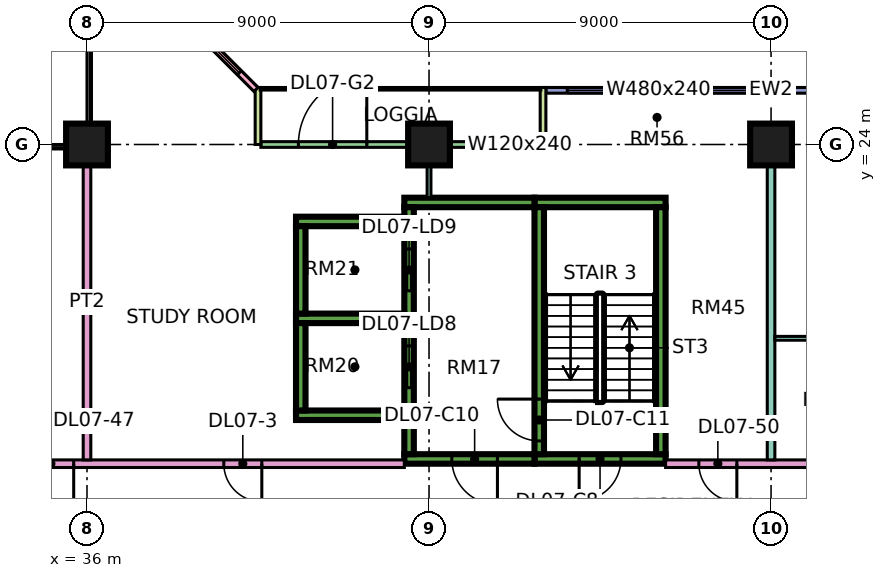
"""IFC4 building model, lengths in metres.
Left out: names, types, materials, properties, quantities, classifications, styles, units other than length and angle.
Written with IfcOpenShell. Run it as: python <this file> out.ifc"""

import sys

from ifc_helpers import new_model, si_unit, direction, frame, frame_2d, origin, origin_2d, place, context, subcontext, project, spatial, rectangle, extrude, element, fill, save


model = new_model("IFC4")
c1 = context("Model", 3, precision=1e-05, world=origin(), true_north=direction((0.0, 1.0)))
c2 = subcontext(c1, "Body", "Model", "MODEL_VIEW")
j1 = project(units=[si_unit("LENGTHUNIT", "METRE"), si_unit("PLANEANGLEUNIT", "RADIAN")], contexts=[c1])
p1 = place(None, origin())
s1 = spatial("IfcSite", under=j1, at=p1, CompositionType="ELEMENT")
p2 = place(p1, origin())
s2 = spatial("IfcBuilding", under=s1, at=p2, CompositionType="ELEMENT")
p3 = place(p2, frame((0.0, 0.0, 41.4)))
s3 = spatial("IfcBuildingStorey", under=s2, at=p3, CompositionType="ELEMENT", Elevation=41.4)
for number, where, z_axis, x_axis in (
    (1, (36.0, 24.0, 0.0), (0.0, 0.0, 1.0), (1.0, 0.0, 0.0)),
    (2, (45.0, 24.0, 0.0), (0.0, 0.0, 1.0), (1.0, 0.0, 0.0)),
    (3, (54.0, 24.0, 0.0), (0.0, 0.0, 1.0), (1.0, 0.0, 0.0)),
):
    element("IfcColumn", number, at=place(p3, frame(where, z_axis=z_axis, x_axis=x_axis)), inside=s3, PredefinedType="COLUMN", context=c2, shape_type="SweptSolid", body=[
        extrude(rectangle(XDim=1.1, YDim=1.1, at=origin_2d()), origin(), (0.0, 0.0, 1.0), 3.75),
    ])
p4 = place(p3, frame((47.775, 15.725, 0.0), z_axis=(0.0, 0.0, 1.0), x_axis=(1.0, 0.0, 0.0)))
e4 = element("IfcWall", 4, at=p4, inside=s3, PredefinedType="SHEAR", context=c2, shape_type="SweptSolid", body=[
    extrude(rectangle(XDim=3.45, YDim=0.25, at=frame_2d((1.725, 0.0))), origin(), (0.0, 0.0, 1.0), 3.75),
])
p5 = place(p4, frame((1.175, 0.0, 0.0)))
e5 = element("IfcOpeningElement", 5, at=p5, cuts=e4, PredefinedType="OPENING", context=c2, shape_type="SweptSolid", body=[
    extrude(rectangle(XDim=1.1, YDim=2.2, at=frame_2d((0.55, 1.1))), frame((0.0, 0.135, 0.0), z_axis=(0.0, -1.0, 0.0), x_axis=(1.0, 0.0, 0.0)), (0.0, 0.0, 1.0), 0.27),
])
p6 = place(p3, frame((47.775, 22.475, 0.0), z_axis=(0.0, 0.0, 1.0), x_axis=(1.0, 0.0, 0.0)))
e6 = element("IfcWall", 6, at=p6, inside=s3, PredefinedType="SHEAR", context=c2, shape_type="SweptSolid", body=[
    extrude(rectangle(XDim=3.45, YDim=0.25, at=frame_2d((1.725, 0.0))), origin(), (0.0, 0.0, 1.0), 3.75),
])
p7 = place(p3, frame((47.9, 15.85, 0.0), z_axis=(0.0, 0.0, 1.0), x_axis=(0.0, 1.0, 0.0)))
e7 = element("IfcWall", 7, at=p7, inside=s3, PredefinedType="SHEAR", context=c2, shape_type="SweptSolid", body=[
    extrude(rectangle(XDim=6.5, YDim=0.25, at=frame_2d((3.25, 0.0))), origin(), (0.0, 0.0, 1.0), 3.75),
])
p8 = place(p7, frame((0.35, 0.0, 0.0)))
e8 = element("IfcOpeningElement", 8, at=p8, cuts=e7, PredefinedType="OPENING", context=c2, shape_type="SweptSolid", body=[
    extrude(rectangle(XDim=1.1, YDim=2.2, at=frame_2d((0.55, 1.1))), frame((0.0, 0.135, 0.0), z_axis=(0.0, -1.0, 0.0), x_axis=(1.0, 0.0, 0.0)), (0.0, 0.0, 1.0), 0.27),
])
p9 = place(p3, frame((51.1, 15.85, 0.0), z_axis=(0.0, 0.0, 1.0), x_axis=(0.0, 1.0, 0.0)))
e9 = element("IfcWall", 9, at=p9, inside=s3, PredefinedType="SHEAR", context=c2, shape_type="SweptSolid", body=[
    extrude(rectangle(XDim=6.5, YDim=0.25, at=frame_2d((3.25, 0.0))), origin(), (0.0, 0.0, 1.0), 3.75),
])
p10 = place(p3, frame((44.35, 15.725, 0.0), z_axis=(0.0, 0.0, 1.0), x_axis=(1.0, 0.0, 0.0)))
e10 = element("IfcWall", 10, at=p10, inside=s3, PredefinedType="SHEAR", context=c2, shape_type="SweptSolid", body=[
    extrude(rectangle(XDim=3.425, YDim=0.25, at=frame_2d((1.712, 0.0))), origin(), (0.0, 0.0, 1.0), 3.75),
])
p11 = place(p10, frame((1.25, 0.0, 0.0)))
e11 = element("IfcOpeningElement", 11, at=p11, cuts=e10, PredefinedType="OPENING", context=c2, shape_type="SweptSolid", body=[
    extrude(rectangle(XDim=1.2, YDim=2.2, at=frame_2d((0.6, 1.1))), frame((0.0, 0.135, 0.0), z_axis=(0.0, -1.0, 0.0), x_axis=(1.0, 0.0, 0.0)), (0.0, 0.0, 1.0), 0.27),
])
p12 = place(p3, frame((44.35, 22.475, 0.0), z_axis=(0.0, 0.0, 1.0), x_axis=(1.0, 0.0, 0.0)))
e12 = element("IfcWall", 12, at=p12, inside=s3, PredefinedType="SHEAR", context=c2, shape_type="SweptSolid", body=[
    extrude(rectangle(XDim=3.425, YDim=0.25, at=frame_2d((1.712, 0.0))), origin(), (0.0, 0.0, 1.0), 3.75),
])
p13 = place(p3, frame((44.475, 15.85, 0.0), z_axis=(0.0, 0.0, 1.0), x_axis=(0.0, 1.0, 0.0)))
e13 = element("IfcWall", 13, at=p13, inside=s3, PredefinedType="SHEAR", context=c2, shape_type="SweptSolid", body=[
    extrude(rectangle(XDim=6.5, YDim=0.25, at=frame_2d((3.25, 0.0))), origin(), (0.0, 0.0, 1.0), 3.75),
])
p14 = place(p13, frame((1.75, 0.0, 0.0)))
e14 = element("IfcOpeningElement", 14, at=p14, cuts=e13, PredefinedType="OPENING", context=c2, shape_type="SweptSolid", body=[
    extrude(rectangle(XDim=1.1, YDim=2.2, at=frame_2d((0.55, 1.1))), frame((0.0, 0.135, 0.0), z_axis=(0.0, -1.0, 0.0), x_axis=(1.0, 0.0, 0.0)), (0.0, 0.0, 1.0), 0.27),
])
p15 = place(p13, frame((4.3, 0.0, 0.0)))
e15 = element("IfcOpeningElement", 15, at=p15, cuts=e13, PredefinedType="OPENING", context=c2, shape_type="SweptSolid", body=[
    extrude(rectangle(XDim=1.1, YDim=2.2, at=frame_2d((0.55, 1.1))), frame((0.0, 0.135, 0.0), z_axis=(0.0, -1.0, 0.0), x_axis=(1.0, 0.0, 0.0)), (0.0, 0.0, 1.0), 0.27),
])
for number, where, z_axis, x_axis in (
    (16, (41.5, 16.875, 0.0), (0.0, 0.0, 1.0), (1.0, 0.0, 0.0)),
    (17, (41.5, 19.425, 0.0), (0.0, 0.0, 1.0), (1.0, 0.0, 0.0)),
    (18, (41.5, 21.975, 0.0), (0.0, 0.0, 1.0), (1.0, 0.0, 0.0)),
):
    element("IfcWall", number, at=place(p3, frame(where, z_axis=z_axis, x_axis=x_axis)), inside=s3, PredefinedType="SHEAR", context=c2, shape_type="SweptSolid", body=[
        extrude(rectangle(XDim=2.85, YDim=0.25, at=frame_2d((1.425, 0.0))), origin(), (0.0, 0.0, 1.0), 3.75),
    ])
for number, where, z_axis, x_axis in (
    (19, (41.625, 17.0, 0.0), (0.0, 0.0, 1.0), (0.0, 1.0, 0.0)),
    (20, (41.625, 19.55, 0.0), (0.0, 0.0, 1.0), (0.0, 1.0, 0.0)),
):
    element("IfcWall", number, at=place(p3, frame(where, z_axis=z_axis, x_axis=x_axis)), inside=s3, PredefinedType="SHEAR", context=c2, shape_type="SweptSolid", body=[
        extrude(rectangle(XDim=2.3, YDim=0.25, at=frame_2d((1.15, 0.0))), origin(), (0.0, 0.0, 1.0), 3.75),
    ])
p16 = place(p3, frame((59.925, 25.425, 0.0), z_axis=(0.0, 0.0, 1.0), x_axis=(-1.0, 0.0, 0.0)))
e21 = element("IfcWall", 21, at=p16, inside=s3, PredefinedType="SOLIDWALL", context=c2, shape_type="SweptSolid", body=[
    extrude(rectangle(XDim=11.85, YDim=0.15, at=frame_2d((5.925, 0.0))), origin(), (0.0, 0.0, 1.0), 3.35),
])
p17 = place(p16, frame((1.462, 0.0, 0.45)))
e22 = element("IfcOpeningElement", 22, at=p17, cuts=e21, PredefinedType="OPENING", context=c2, shape_type="SweptSolid", body=[
    extrude(rectangle(XDim=3.0, YDim=2.4, at=frame_2d((1.5, 1.2))), frame((0.0, 0.085, 0.0), z_axis=(0.0, -1.0, 0.0), x_axis=(1.0, 0.0, 0.0)), (0.0, 0.0, 1.0), 0.17),
])
p18 = place(p16, frame((6.488, 0.0, 0.45)))
e23 = element("IfcOpeningElement", 23, at=p18, cuts=e21, PredefinedType="OPENING", context=c2, shape_type="SweptSolid", body=[
    extrude(rectangle(XDim=4.8, YDim=2.4, at=frame_2d((2.4, 1.2))), frame((0.0, 0.085, 0.0), z_axis=(0.0, -1.0, 0.0), x_axis=(1.0, 0.0, 0.0)), (0.0, 0.0, 1.0), 0.17),
])
p19 = place(p3, frame((47.925, 24.0, 0.0), z_axis=(0.0, 0.0, 1.0), x_axis=(-1.0, 0.0, 0.0)))
e24 = element("IfcWall", 24, at=p19, inside=s3, PredefinedType="SOLIDWALL", context=c2, shape_type="SweptSolid", body=[
    extrude(rectangle(XDim=7.35, YDim=0.15, at=frame_2d((3.675, 0.0))), origin(), (0.0, 0.0, 1.0), 3.35),
])
p20 = place(p19, frame((0.538, 0.0, 0.45)))
e25 = element("IfcOpeningElement", 25, at=p20, cuts=e24, PredefinedType="OPENING", context=c2, shape_type="SweptSolid", body=[
    extrude(rectangle(XDim=1.2, YDim=2.4, at=frame_2d((0.6, 1.2))), frame((0.0, 0.085, 0.0), z_axis=(0.0, -1.0, 0.0), x_axis=(1.0, 0.0, 0.0)), (0.0, 0.0, 1.0), 0.17),
])
p21 = place(p19, frame((4.562, 0.0, 0.0)))
e26 = element("IfcOpeningElement", 26, at=p21, cuts=e24, PredefinedType="OPENING", context=c2, shape_type="SweptSolid", body=[
    extrude(rectangle(XDim=1.8, YDim=2.4, at=frame_2d((0.9, 1.2))), frame((0.0, 0.085, 0.0), z_axis=(0.0, -1.0, 0.0), x_axis=(1.0, 0.0, 0.0)), (0.0, 0.0, 1.0), 0.17),
])
for number, where, z_axis, x_axis in (
    (27, (48.0, 25.5, 0.0), (0.0, 0.0, 1.0), (0.0, -1.0, 0.0)),
    (28, (40.5, 25.5, 0.0), (0.0, 0.0, 1.0), (0.0, -1.0, 0.0)),
):
    element("IfcWall", number, at=place(p3, frame(where, z_axis=z_axis, x_axis=x_axis)), inside=s3, PredefinedType="SOLIDWALL", context=c2, shape_type="SweptSolid", body=[
        extrude(rectangle(XDim=1.5, YDim=0.15, at=frame_2d((0.75, 0.0))), origin(), (0.0, 0.0, 1.0), 3.35),
    ])
p22 = place(p3, frame((40.447, 25.447, 0.0), z_axis=(0.0, 0.0, 1.0), x_axis=(-0.707106781187, 0.707106781187, 0.0)))
e29 = element("IfcWall", 29, at=p22, inside=s3, PredefinedType="SOLIDWALL", context=c2, shape_type="SweptSolid", body=[
    extrude(rectangle(XDim=4.243, YDim=0.15, at=frame_2d((2.121, 0.0))), origin(), (0.0, 0.0, 1.0), 3.35),
])
p23 = place(p22, frame((0.621, 0.0, 0.45)))
e30 = element("IfcOpeningElement", 30, at=p23, cuts=e29, PredefinedType="OPENING", context=c2, shape_type="SweptSolid", body=[
    extrude(rectangle(XDim=3.0, YDim=2.4, at=frame_2d((1.5, 1.2))), frame((0.0, 0.085, 0.0), z_axis=(0.0, -1.0, 0.0), x_axis=(1.0, 0.0, 0.0)), (0.0, 0.0, 1.0), 0.17),
])
p24 = place(p3, frame((34.0, 15.6, 0.0), z_axis=(0.0, 0.0, 1.0), x_axis=(1.0, 0.0, 0.0)))
e31 = element("IfcWall", 31, at=p24, inside=s3, PredefinedType="PARTITIONING", context=c2, shape_type="SweptSolid", body=[
    extrude(rectangle(XDim=10.35, YDim=0.2, at=frame_2d((5.175, 0.0))), origin(), (0.0, 0.0, 1.0), 3.35),
])
p25 = place(p24, frame((5.6, 0.0, 0.0)))
e32 = element("IfcOpeningElement", 32, at=p25, cuts=e31, PredefinedType="OPENING", context=c2, shape_type="SweptSolid", body=[
    extrude(rectangle(XDim=1.0, YDim=2.1, at=frame_2d((0.5, 1.05))), frame((0.0, 0.11, 0.0), z_axis=(0.0, -1.0, 0.0), x_axis=(1.0, 0.0, 0.0)), (0.0, 0.0, 1.0), 0.22),
])
p26 = place(p24, frame((0.45, 0.0, 0.0)))
e33 = element("IfcOpeningElement", 33, at=p26, cuts=e31, PredefinedType="OPENING", context=c2, shape_type="SweptSolid", body=[
    extrude(rectangle(XDim=1.2, YDim=2.1, at=frame_2d((0.6, 1.05))), frame((0.0, 0.11, 0.0), z_axis=(0.0, -1.0, 0.0), x_axis=(1.0, 0.0, 0.0)), (0.0, 0.0, 1.0), 0.22),
])
p27 = place(p3, frame((36.0, 15.7, 0.0), z_axis=(0.0, 0.0, 1.0), x_axis=(0.0, 1.0, 0.0)))
e34 = element("IfcWall", 34, at=p27, inside=s3, PredefinedType="PARTITIONING", context=c2, shape_type="SweptSolid", body=[
    extrude(rectangle(XDim=8.3, YDim=0.2, at=frame_2d((4.15, 0.0))), origin(), (0.0, 0.0, 1.0), 3.35),
])
p28 = place(p3, frame((45.0, 22.6, 0.0), z_axis=(0.0, 0.0, 1.0), x_axis=(0.0, 1.0, 0.0)))
e35 = element("IfcWall", 35, at=p28, inside=s3, PredefinedType="PARTITIONING", context=c2, shape_type="SweptSolid", body=[
    extrude(rectangle(XDim=1.326, YDim=0.1, at=frame_2d((0.663, 0.0))), origin(), (0.0, 0.0, 1.0), 3.35),
])
p29 = place(p3, frame((51.225, 15.6, 0.0), z_axis=(0.0, 0.0, 1.0), x_axis=(1.0, 0.0, 0.0)))
e36 = element("IfcWall", 36, at=p29, inside=s3, PredefinedType="PARTITIONING", context=c2, shape_type="SweptSolid", body=[
    extrude(rectangle(XDim=20.701, YDim=0.2, at=frame_2d((10.351, 0.0))), origin(), (0.0, 0.0, 1.0), 3.35),
])
p30 = place(p29, frame((9.875, 0.0, 0.0)))
e37 = element("IfcOpeningElement", 37, at=p30, cuts=e36, PredefinedType="OPENING", context=c2, shape_type="SweptSolid", body=[
    extrude(rectangle(XDim=1.0, YDim=2.1, at=frame_2d((0.5, 1.05))), frame((0.0, 0.11, 0.0), z_axis=(0.0, -1.0, 0.0), x_axis=(1.0, 0.0, 0.0)), (0.0, 0.0, 1.0), 0.22),
])
p31 = place(p29, frame((0.875, 0.0, 0.0)))
e38 = element("IfcOpeningElement", 38, at=p31, cuts=e36, PredefinedType="OPENING", context=c2, shape_type="SweptSolid", body=[
    extrude(rectangle(XDim=1.0, YDim=2.1, at=frame_2d((0.5, 1.05))), frame((0.0, 0.11, 0.0), z_axis=(0.0, -1.0, 0.0), x_axis=(1.0, 0.0, 0.0)), (0.0, 0.0, 1.0), 0.22),
])
p32 = place(p3, frame((54.0, 15.7, 0.0), z_axis=(0.0, 0.0, 1.0), x_axis=(0.0, 1.0, 0.0)))
e39 = element("IfcWall", 39, at=p32, inside=s3, PredefinedType="PARTITIONING", context=c2, shape_type="SweptSolid", body=[
    extrude(rectangle(XDim=8.3, YDim=0.2, at=frame_2d((4.15, 0.0))), origin(), (0.0, 0.0, 1.0), 3.35),
])
p33 = place(p3, frame((54.1, 18.9, 0.0), z_axis=(0.0, 0.0, 1.0), x_axis=(1.0, 0.0, 0.0)))
e40 = element("IfcWall", 40, at=p33, inside=s3, PredefinedType="PARTITIONING", context=c2, shape_type="SweptSolid", body=[
    extrude(rectangle(XDim=5.65, YDim=0.1, at=frame_2d((2.825, 0.0))), origin(), (0.0, 0.0, 1.0), 3.35),
])
p34 = place(p18, origin())
e41 = element("IfcWindow", 41, at=p34, inside=s3, PartitioningType="SINGLE_PANEL", PredefinedType="WINDOW", context=c2, shape_type="SweptSolid", body=[
    extrude(rectangle(XDim=4.8, YDim=2.4, at=frame_2d((2.4, 1.2))), frame((0.0, 0.03, 0.0), z_axis=(0.0, -1.0, 0.0), x_axis=(1.0, 0.0, 0.0)), (0.0, 0.0, 1.0), 0.06),
])
fill(e23, e41)
p35 = place(p20, origin())
e42 = element("IfcWindow", 42, at=p35, inside=s3, PartitioningType="SINGLE_PANEL", PredefinedType="WINDOW", context=c2, shape_type="SweptSolid", body=[
    extrude(rectangle(XDim=1.2, YDim=2.4, at=frame_2d((0.6, 1.2))), frame((0.0, 0.03, 0.0), z_axis=(0.0, -1.0, 0.0), x_axis=(1.0, 0.0, 0.0)), (0.0, 0.0, 1.0), 0.06),
])
fill(e25, e42)
p36 = place(p21, frame((1.8, 0.0, 0.0), z_axis=(0.0, 0.0, 1.0), x_axis=(-1.0, 0.0, 0.0)))
e43 = element("IfcDoor", 43, at=p36, inside=s3, OperationType="DOUBLE_DOOR_SINGLE_SWING", PredefinedType="DOOR", context=c2, shape_type="SweptSolid", body=[
    extrude(rectangle(XDim=1.8, YDim=2.4, at=frame_2d((0.9, 1.2))), frame((0.0, 0.025, 0.0), z_axis=(0.0, -1.0, 0.0), x_axis=(1.0, 0.0, 0.0)), (0.0, 0.0, 1.0), 0.05),
])
fill(e26, e43)
p37 = place(p23, origin())
e44 = element("IfcWindow", 44, at=p37, inside=s3, PartitioningType="SINGLE_PANEL", PredefinedType="WINDOW", context=c2, shape_type="SweptSolid", body=[
    extrude(rectangle(XDim=3.0, YDim=2.4, at=frame_2d((1.5, 1.2))), frame((0.0, 0.03, 0.0), z_axis=(0.0, -1.0, 0.0), x_axis=(1.0, 0.0, 0.0)), (0.0, 0.0, 1.0), 0.06),
])
fill(e30, e44)
p38 = place(p5, frame((1.1, 0.0, 0.0), z_axis=(0.0, 0.0, 1.0), x_axis=(-1.0, 0.0, 0.0)))
e45 = element("IfcDoor", 45, at=p38, inside=s3, OperationType="SINGLE_SWING_LEFT", PredefinedType="DOOR", context=c2, shape_type="SweptSolid", body=[
    extrude(rectangle(XDim=1.1, YDim=2.2, at=frame_2d((0.55, 1.1))), frame((0.0, 0.025, 0.0), z_axis=(0.0, -1.0, 0.0), x_axis=(1.0, 0.0, 0.0)), (0.0, 0.0, 1.0), 0.05),
])
fill(e5, e45)
p39 = place(p11, origin())
e46 = element("IfcDoor", 46, at=p39, inside=s3, OperationType="SINGLE_SWING_RIGHT", PredefinedType="DOOR", context=c2, shape_type="SweptSolid", body=[
    extrude(rectangle(XDim=1.2, YDim=2.2, at=frame_2d((0.6, 1.1))), frame((0.0, 0.025, 0.0), z_axis=(0.0, -1.0, 0.0), x_axis=(1.0, 0.0, 0.0)), (0.0, 0.0, 1.0), 0.05),
])
fill(e11, e46)
p40 = place(p8, frame((1.1, 0.0, 0.0), z_axis=(0.0, 0.0, 1.0), x_axis=(-1.0, 0.0, 0.0)))
e47 = element("IfcDoor", 47, at=p40, inside=s3, OperationType="SINGLE_SWING_RIGHT", PredefinedType="DOOR", context=c2, shape_type="SweptSolid", body=[
    extrude(rectangle(XDim=1.1, YDim=2.2, at=frame_2d((0.55, 1.1))), frame((0.0, 0.025, 0.0), z_axis=(0.0, -1.0, 0.0), x_axis=(1.0, 0.0, 0.0)), (0.0, 0.0, 1.0), 0.05),
])
fill(e8, e47)
p41 = place(p14, origin())
e48 = element("IfcDoor", 48, at=p41, inside=s3, OperationType="DOUBLE_DOOR_SLIDING", PredefinedType="DOOR", context=c2, shape_type="SweptSolid", body=[
    extrude(rectangle(XDim=1.1, YDim=2.2, at=frame_2d((0.55, 1.1))), frame((0.0, 0.025, 0.0), z_axis=(0.0, -1.0, 0.0), x_axis=(1.0, 0.0, 0.0)), (0.0, 0.0, 1.0), 0.05),
])
fill(e14, e48)
p42 = place(p15, origin())
e49 = element("IfcDoor", 49, at=p42, inside=s3, OperationType="DOUBLE_DOOR_SLIDING", PredefinedType="DOOR", context=c2, shape_type="SweptSolid", body=[
    extrude(rectangle(XDim=1.1, YDim=2.2, at=frame_2d((0.55, 1.1))), frame((0.0, 0.025, 0.0), z_axis=(0.0, -1.0, 0.0), x_axis=(1.0, 0.0, 0.0)), (0.0, 0.0, 1.0), 0.05),
])
fill(e15, e49)
p43 = place(p25, origin())
e50 = element("IfcDoor", 50, at=p43, inside=s3, OperationType="SINGLE_SWING_RIGHT", PredefinedType="DOOR", context=c2, shape_type="SweptSolid", body=[
    extrude(rectangle(XDim=1.0, YDim=2.1, at=frame_2d((0.5, 1.05))), frame((0.0, 0.025, 0.0), z_axis=(0.0, -1.0, 0.0), x_axis=(1.0, 0.0, 0.0)), (0.0, 0.0, 1.0), 0.05),
])
fill(e32, e50)
p44 = place(p26, origin())
e51 = element("IfcDoor", 51, at=p44, inside=s3, OperationType="SINGLE_SWING_RIGHT", PredefinedType="DOOR", context=c2, shape_type="SweptSolid", body=[
    extrude(rectangle(XDim=1.2, YDim=2.1, at=frame_2d((0.6, 1.05))), frame((0.0, 0.025, 0.0), z_axis=(0.0, -1.0, 0.0), x_axis=(1.0, 0.0, 0.0)), (0.0, 0.0, 1.0), 0.05),
])
fill(e33, e51)
p45 = place(p31, origin())
e52 = element("IfcDoor", 52, at=p45, inside=s3, OperationType="SINGLE_SWING_RIGHT", PredefinedType="DOOR", context=c2, shape_type="SweptSolid", body=[
    extrude(rectangle(XDim=1.0, YDim=2.1, at=frame_2d((0.5, 1.05))), frame((0.0, 0.025, 0.0), z_axis=(0.0, -1.0, 0.0), x_axis=(1.0, 0.0, 0.0)), (0.0, 0.0, 1.0), 0.05),
])
fill(e38, e52)
save(model, sys.argv[1])
